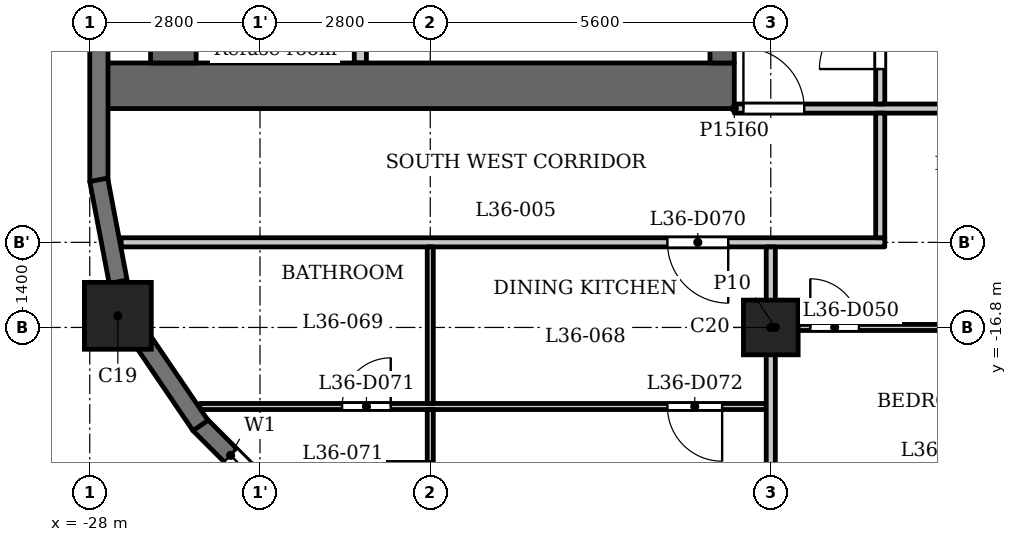
"""IFC4 building model, lengths in metres.
Left out: names, types, materials, properties, quantities, classifications, styles, units other than length and angle.
Written with IfcOpenShell. Run it as: python <this file> out.ifc"""

import sys

from ifc_helpers import new_model, si_unit, direction, frame, frame_2d, origin, origin_2d, place, context, subcontext, project, spatial, rectangle, extrude, element, fill, save


model = new_model("IFC4")
c1 = context("Model", 3, precision=1e-05, world=origin(), true_north=direction((0.0, 1.0)))
c2 = subcontext(c1, "Body", "Model", "MODEL_VIEW")
j1 = project(units=[si_unit("LENGTHUNIT", "METRE"), si_unit("PLANEANGLEUNIT", "RADIAN")], contexts=[c1])
p1 = place(None, origin())
s1 = spatial("IfcSite", under=j1, at=p1, CompositionType="ELEMENT")
p2 = place(p1, origin())
s2 = spatial("IfcBuilding", under=s1, at=p2, CompositionType="ELEMENT")
p3 = place(p2, frame((0.0, 0.0, 143.1)))
s3 = spatial("IfcBuildingStorey", under=s2, at=p3, CompositionType="ELEMENT", Elevation=143.1)
p4 = place(p3, frame((-27.538, -16.609, 0.0), z_axis=(0.0, 0.0, 1.0), x_axis=(1.0, 0.0, 0.0)))
e1 = element("IfcColumn", 1, at=p4, inside=s3, PredefinedType="COLUMN", context=c2, shape_type="SweptSolid", body=[
    extrude(rectangle(XDim=1.1, YDim=1.1, at=origin_2d()), origin(), (0.0, 0.0, 1.0), 3.5),
])
p5 = place(p3, frame((-16.8, -16.8, 0.0), z_axis=(0.0, 0.0, 1.0), x_axis=(1.0, 0.0, 0.0)))
e2 = element("IfcColumn", 2, at=p5, inside=s3, PredefinedType="COLUMN", context=c2, shape_type="SweptSolid", body=[
    extrude(rectangle(XDim=0.9, YDim=0.9, at=origin_2d()), origin(), (0.0, 0.0, 1.0), 3.5),
])
p6 = place(p3, frame((-26.197, -18.391, 0.0), z_axis=(0.0, 0.0, 1.0), x_axis=(0.707060717099, -0.707152842274, 0.0)))
e3 = element("IfcWall", 3, at=p6, inside=s3, PredefinedType="SOLIDWALL", context=c2, shape_type="SweptSolid", body=[
    extrude(rectangle(XDim=2.65, YDim=0.3, at=frame_2d((1.325, 0.0))), origin(), (0.0, 0.0, 1.0), 2.45),
])
p7 = place(p6, frame((0.725, 0.0, 0.6)))
e4 = element("IfcOpeningElement", 4, at=p7, cuts=e3, PredefinedType="OPENING", context=c2, shape_type="SweptSolid", body=[
    extrude(rectangle(XDim=1.2, YDim=1.55, at=frame_2d((0.6, 0.775))), frame((0.0, 0.16, 0.0), z_axis=(0.0, -1.0, 0.0), x_axis=(1.0, 0.0, 0.0)), (0.0, 0.0, 1.0), 0.32),
])
p8 = place(p3, frame((-27.85, -11.75, 0.0), z_axis=(0.0, 0.0, 1.0), x_axis=(0.0, -1.0, 0.0)))
e5 = element("IfcWall", 5, at=p8, inside=s3, PredefinedType="SOLIDWALL", context=c2, shape_type="SweptSolid", body=[
    extrude(rectangle(XDim=2.65, YDim=0.3, at=frame_2d((1.325, 0.0))), origin(), (0.0, 0.0, 1.0), 2.45),
])
p9 = place(p3, frame((-27.853, -14.372, 0.0), z_axis=(0.0, 0.0, 1.0), x_axis=(0.187302784601, -0.982302227871, 0.0)))
e6 = element("IfcWall", 6, at=p9, inside=s3, PredefinedType="SOLIDWALL", context=c2, shape_type="SweptSolid", body=[
    extrude(rectangle(XDim=1.706, YDim=0.3, at=frame_2d((0.853, 0.0))), origin(), (0.0, 0.0, 1.0), 2.45),
])
p10 = place(p3, frame((-27.138, -17.002, 0.0), z_axis=(0.0, 0.0, 1.0), x_axis=(0.562075160946, -0.827086158419, 0.0)))
e7 = element("IfcWall", 7, at=p10, inside=s3, PredefinedType="SOLIDWALL", context=c2, shape_type="SweptSolid", body=[
    extrude(rectangle(XDim=1.706, YDim=0.3, at=frame_2d((0.853, 0.0))), origin(), (0.0, 0.0, 1.0), 2.45),
])
p11 = place(p3, frame((-17.4, -12.825, 0.0), z_axis=(0.0, 0.0, 1.0), x_axis=(-1.0, 0.0, 0.0)))
e8 = element("IfcWall", 8, at=p11, inside=s3, PredefinedType="SHEAR", context=c2, shape_type="SweptSolid", body=[
    extrude(rectangle(XDim=10.4, YDim=0.75, at=frame_2d((5.2, 0.0))), origin(), (0.0, 0.0, 1.0), 3.2),
])
p12 = place(p3, frame((-17.6, -12.45, 0.0), z_axis=(0.0, 0.0, 1.0), x_axis=(0.0, 1.0, 0.0)))
e9 = element("IfcWall", 9, at=p12, inside=s3, PredefinedType="SHEAR", context=c2, shape_type="SweptSolid", body=[
    extrude(rectangle(XDim=24.9, YDim=0.4, at=frame_2d((12.45, 0.0))), origin(), (0.0, 0.0, 1.0), 3.2),
])
p13 = place(p12, frame((8.65, 0.0, 0.0)))
e10 = element("IfcOpeningElement", 10, at=p13, cuts=e9, PredefinedType="OPENING", context=c2, shape_type="SweptSolid", body=[
    extrude(rectangle(XDim=0.9, YDim=2.1, at=frame_2d((0.45, 1.05))), frame((0.0, 0.21, 0.0), z_axis=(0.0, -1.0, 0.0), x_axis=(1.0, 0.0, 0.0)), (0.0, 0.0, 1.0), 0.42),
])
p14 = place(p12, frame((15.6, 0.0, 0.0)))
e11 = element("IfcOpeningElement", 11, at=p14, cuts=e9, PredefinedType="OPENING", context=c2, shape_type="SweptSolid", body=[
    extrude(rectangle(XDim=1.1, YDim=2.1, at=frame_2d((0.55, 1.05))), frame((0.0, 0.21, 0.0), z_axis=(0.0, -1.0, 0.0), x_axis=(1.0, 0.0, 0.0)), (0.0, 0.0, 1.0), 0.42),
])
p15 = place(p12, frame((18.0, 0.0, 0.0)))
e12 = element("IfcOpeningElement", 12, at=p15, cuts=e9, PredefinedType="OPENING", context=c2, shape_type="SweptSolid", body=[
    extrude(rectangle(XDim=1.1, YDim=2.1, at=frame_2d((0.55, 1.05))), frame((0.0, 0.21, 0.0), z_axis=(0.0, -1.0, 0.0), x_axis=(1.0, 0.0, 0.0)), (0.0, 0.0, 1.0), 0.42),
])
p16 = place(p12, frame((23.025, 0.0, 0.0)))
e13 = element("IfcOpeningElement", 13, at=p16, cuts=e9, PredefinedType="OPENING", context=c2, shape_type="SweptSolid", body=[
    extrude(rectangle(XDim=1.1, YDim=2.1, at=frame_2d((0.55, 1.05))), frame((0.0, 0.21, 0.0), z_axis=(0.0, -1.0, 0.0), x_axis=(1.0, 0.0, 0.0)), (0.0, 0.0, 1.0), 0.42),
])
p17 = place(p12, frame((0.775, 0.0, 0.0)))
e14 = element("IfcOpeningElement", 14, at=p17, cuts=e9, PredefinedType="OPENING", context=c2, shape_type="SweptSolid", body=[
    extrude(rectangle(XDim=1.1, YDim=2.1, at=frame_2d((0.55, 1.05))), frame((0.0, 0.21, 0.0), z_axis=(0.0, -1.0, 0.0), x_axis=(1.0, 0.0, 0.0)), (0.0, 0.0, 1.0), 0.42),
])
p18 = place(p12, frame((12.925, 0.0, 0.0)))
e15 = element("IfcOpeningElement", 15, at=p18, cuts=e9, PredefinedType="OPENING", context=c2, shape_type="SweptSolid", body=[
    extrude(rectangle(XDim=1.8, YDim=2.1, at=frame_2d((0.9, 1.05))), frame((0.0, 0.21, 0.0), z_axis=(0.0, -1.0, 0.0), x_axis=(1.0, 0.0, 0.0)), (0.0, 0.0, 1.0), 0.42),
])
p19 = place(p3, frame((-26.625, -12.45, 0.0), z_axis=(0.0, 0.0, 1.0), x_axis=(0.0, 1.0, 0.0)))
e16 = element("IfcWall", 16, at=p19, inside=s3, PredefinedType="SHEAR", context=c2, shape_type="SweptSolid", body=[
    extrude(rectangle(XDim=24.9, YDim=0.75, at=frame_2d((12.45, 0.0))), origin(), (0.0, 0.0, 1.0), 3.2),
])
p20 = place(p3, frame((-23.55, -12.45, 0.0), z_axis=(0.0, 0.0, 1.0), x_axis=(0.0, 1.0, 0.0)))
e17 = element("IfcWall", 17, at=p20, inside=s3, PredefinedType="PARTITIONING", context=c2, shape_type="SweptSolid", body=[
    extrude(rectangle(XDim=2.65, YDim=0.2, at=frame_2d((1.325, 0.0))), origin(), (0.0, 0.0, 1.0), 3.2),
])
p21 = place(p20, frame((0.875, 0.0, 0.0)))
e18 = element("IfcOpeningElement", 18, at=p21, cuts=e17, PredefinedType="OPENING", context=c2, shape_type="SweptSolid", body=[
    extrude(rectangle(XDim=0.9, YDim=2.1, at=frame_2d((0.45, 1.05))), frame((0.0, 0.11, 0.0), z_axis=(0.0, -1.0, 0.0), x_axis=(1.0, 0.0, 0.0)), (0.0, 0.0, 1.0), 0.22),
])
p22 = place(p3, frame((-26.19, -18.1, 0.0), z_axis=(0.0, 0.0, 1.0), x_axis=(1.0, 0.0, 0.0)))
e19 = element("IfcWall", 19, at=p22, inside=s3, PredefinedType="PARTITIONING", context=c2, shape_type="SweptSolid", body=[
    extrude(rectangle(XDim=9.315, YDim=0.1, at=frame_2d((4.658, 0.0))), origin(), (0.0, 0.0, 1.0), 3.2),
])
p23 = place(p22, frame((2.34, 0.0, 0.0)))
e20 = element("IfcOpeningElement", 20, at=p23, cuts=e19, PredefinedType="OPENING", context=c2, shape_type="SweptSolid", body=[
    extrude(rectangle(XDim=0.8, YDim=2.1, at=frame_2d((0.4, 1.05))), frame((0.0, 0.06, 0.0), z_axis=(0.0, -1.0, 0.0), x_axis=(1.0, 0.0, 0.0)), (0.0, 0.0, 1.0), 0.12),
])
p24 = place(p22, frame((7.69, 0.0, 0.0)))
e21 = element("IfcOpeningElement", 21, at=p24, cuts=e19, PredefinedType="OPENING", context=c2, shape_type="SweptSolid", body=[
    extrude(rectangle(XDim=0.9, YDim=2.1, at=frame_2d((0.45, 1.05))), frame((0.0, 0.06, 0.0), z_axis=(0.0, -1.0, 0.0), x_axis=(1.0, 0.0, 0.0)), (0.0, 0.0, 1.0), 0.12),
])
p25 = place(p3, frame((-16.725, -16.8, 0.0), z_axis=(0.0, 0.0, 1.0), x_axis=(1.0, 0.0, 0.0)))
e22 = element("IfcWall", 22, at=p25, inside=s3, PredefinedType="PARTITIONING", context=c2, shape_type="SweptSolid", body=[
    extrude(rectangle(XDim=33.45, YDim=0.1, at=frame_2d((16.725, 0.0))), origin(), (0.0, 0.0, 1.0), 3.2),
])
p26 = place(p25, frame((0.575, 0.0, 0.0)))
e23 = element("IfcOpeningElement", 23, at=p26, cuts=e22, PredefinedType="OPENING", context=c2, shape_type="SweptSolid", body=[
    extrude(rectangle(XDim=0.8, YDim=2.1, at=frame_2d((0.4, 1.05))), frame((0.0, 0.06, 0.0), z_axis=(0.0, -1.0, 0.0), x_axis=(1.0, 0.0, 0.0)), (0.0, 0.0, 1.0), 0.12),
])
p27 = place(p25, frame((6.175, 0.0, 0.0)))
e24 = element("IfcOpeningElement", 24, at=p27, cuts=e22, PredefinedType="OPENING", context=c2, shape_type="SweptSolid", body=[
    extrude(rectangle(XDim=0.9, YDim=2.1, at=frame_2d((0.45, 1.05))), frame((0.0, 0.06, 0.0), z_axis=(0.0, -1.0, 0.0), x_axis=(1.0, 0.0, 0.0)), (0.0, 0.0, 1.0), 0.12),
])
p28 = place(p25, frame((15.275, 0.0, 0.0)))
e25 = element("IfcOpeningElement", 25, at=p28, cuts=e22, PredefinedType="OPENING", context=c2, shape_type="SweptSolid", body=[
    extrude(rectangle(XDim=0.8, YDim=2.1, at=frame_2d((0.4, 1.05))), frame((0.0, 0.06, 0.0), z_axis=(0.0, -1.0, 0.0), x_axis=(1.0, 0.0, 0.0)), (0.0, 0.0, 1.0), 0.12),
])
p29 = place(p25, frame((11.775, 0.0, 0.0)))
e26 = element("IfcOpeningElement", 26, at=p29, cuts=e22, PredefinedType="OPENING", context=c2, shape_type="SweptSolid", body=[
    extrude(rectangle(XDim=0.9, YDim=2.1, at=frame_2d((0.45, 1.05))), frame((0.0, 0.06, 0.0), z_axis=(0.0, -1.0, 0.0), x_axis=(1.0, 0.0, 0.0)), (0.0, 0.0, 1.0), 0.12),
])
p30 = place(p25, frame((17.275, 0.0, 0.0)))
e27 = element("IfcOpeningElement", 27, at=p30, cuts=e22, PredefinedType="OPENING", context=c2, shape_type="SweptSolid", body=[
    extrude(rectangle(XDim=0.8, YDim=2.1, at=frame_2d((0.4, 1.05))), frame((0.0, 0.06, 0.0), z_axis=(0.0, -1.0, 0.0), x_axis=(1.0, 0.0, 0.0)), (0.0, 0.0, 1.0), 0.12),
])
p31 = place(p25, frame((20.775, 0.0, 0.0)))
e28 = element("IfcOpeningElement", 28, at=p31, cuts=e22, PredefinedType="OPENING", context=c2, shape_type="SweptSolid", body=[
    extrude(rectangle(XDim=0.9, YDim=2.1, at=frame_2d((0.45, 1.05))), frame((0.0, 0.06, 0.0), z_axis=(0.0, -1.0, 0.0), x_axis=(1.0, 0.0, 0.0)), (0.0, 0.0, 1.0), 0.12),
])
p32 = place(p25, frame((31.575, 0.0, 0.0)))
e29 = element("IfcOpeningElement", 29, at=p32, cuts=e22, PredefinedType="OPENING", context=c2, shape_type="SweptSolid", body=[
    extrude(rectangle(XDim=0.8, YDim=2.1, at=frame_2d((0.4, 1.05))), frame((0.0, 0.06, 0.0), z_axis=(0.0, -1.0, 0.0), x_axis=(1.0, 0.0, 0.0)), (0.0, 0.0, 1.0), 0.12),
])
p33 = place(p25, frame((28.575, 0.0, 0.0)))
e30 = element("IfcOpeningElement", 30, at=p33, cuts=e22, PredefinedType="OPENING", context=c2, shape_type="SweptSolid", body=[
    extrude(rectangle(XDim=0.9, YDim=2.1, at=frame_2d((0.45, 1.05))), frame((0.0, 0.06, 0.0), z_axis=(0.0, -1.0, 0.0), x_axis=(1.0, 0.0, 0.0)), (0.0, 0.0, 1.0), 0.12),
])
p34 = place(p25, frame((23.725, 0.0, 0.0)))
e31 = element("IfcOpeningElement", 31, at=p34, cuts=e22, PredefinedType="OPENING", context=c2, shape_type="SweptSolid", body=[
    extrude(rectangle(XDim=0.9, YDim=2.1, at=frame_2d((0.45, 1.05))), frame((0.0, 0.06, 0.0), z_axis=(0.0, -1.0, 0.0), x_axis=(1.0, 0.0, 0.0)), (0.0, 0.0, 1.0), 0.12),
])
p35 = place(p25, frame((26.225, 0.0, 0.0)))
e32 = element("IfcOpeningElement", 32, at=p35, cuts=e22, PredefinedType="OPENING", context=c2, shape_type="SweptSolid", body=[
    extrude(rectangle(XDim=0.9, YDim=2.1, at=frame_2d((0.45, 1.05))), frame((0.0, 0.06, 0.0), z_axis=(0.0, -1.0, 0.0), x_axis=(1.0, 0.0, 0.0)), (0.0, 0.0, 1.0), 0.12),
])
p36 = place(p3, frame((-27.484, -15.4, 0.0), z_axis=(0.0, 0.0, 1.0), x_axis=(1.0, 0.0, 0.0)))
e33 = element("IfcWall", 33, at=p36, inside=s3, PredefinedType="PARTITIONING", context=c2, shape_type="SweptSolid", body=[
    extrude(rectangle(XDim=12.559, YDim=0.15, at=frame_2d((6.279, 0.0))), origin(), (0.0, 0.0, 1.0), 3.2),
])
p37 = place(p36, frame((8.984, 0.0, 0.0)))
e34 = element("IfcOpeningElement", 34, at=p37, cuts=e33, PredefinedType="OPENING", context=c2, shape_type="SweptSolid", body=[
    extrude(rectangle(XDim=1.0, YDim=2.1, at=frame_2d((0.5, 1.05))), frame((0.0, 0.085, 0.0), z_axis=(0.0, -1.0, 0.0), x_axis=(1.0, 0.0, 0.0)), (0.0, 0.0, 1.0), 0.17),
])
p38 = place(p3, frame((-17.4, -13.2, 0.0), z_axis=(0.0, 0.0, 1.0), x_axis=(1.0, 0.0, 0.0)))
e35 = element("IfcWall", 35, at=p38, inside=s3, PredefinedType="PARTITIONING", context=c2, shape_type="SweptSolid", body=[
    extrude(rectangle(XDim=34.8, YDim=0.15, at=frame_2d((17.4, 0.0))), origin(), (0.0, 0.0, 1.0), 3.2),
])
p39 = place(p38, frame((0.15, 0.0, 0.0)))
e36 = element("IfcOpeningElement", 36, at=p39, cuts=e35, PredefinedType="OPENING", context=c2, shape_type="SweptSolid", body=[
    extrude(rectangle(XDim=1.0, YDim=2.1, at=frame_2d((0.5, 1.05))), frame((0.0, 0.085, 0.0), z_axis=(0.0, -1.0, 0.0), x_axis=(1.0, 0.0, 0.0)), (0.0, 0.0, 1.0), 0.17),
])
p40 = place(p38, frame((33.55, 0.0, 0.0)))
e37 = element("IfcOpeningElement", 37, at=p40, cuts=e35, PredefinedType="OPENING", context=c2, shape_type="SweptSolid", body=[
    extrude(rectangle(XDim=1.0, YDim=2.1, at=frame_2d((0.5, 1.05))), frame((0.0, 0.085, 0.0), z_axis=(0.0, -1.0, 0.0), x_axis=(1.0, 0.0, 0.0)), (0.0, 0.0, 1.0), 0.17),
])
p41 = place(p38, frame((6.85, 0.0, 0.0)))
e38 = element("IfcOpeningElement", 38, at=p41, cuts=e35, PredefinedType="OPENING", context=c2, shape_type="SweptSolid", body=[
    extrude(rectangle(XDim=1.0, YDim=2.1, at=frame_2d((0.5, 1.05))), frame((0.0, 0.085, 0.0), z_axis=(0.0, -1.0, 0.0), x_axis=(1.0, 0.0, 0.0)), (0.0, 0.0, 1.0), 0.17),
])
p42 = place(p38, frame((12.45, 0.0, 0.0)))
e39 = element("IfcOpeningElement", 39, at=p42, cuts=e35, PredefinedType="OPENING", context=c2, shape_type="SweptSolid", body=[
    extrude(rectangle(XDim=1.0, YDim=2.1, at=frame_2d((0.5, 1.05))), frame((0.0, 0.085, 0.0), z_axis=(0.0, -1.0, 0.0), x_axis=(1.0, 0.0, 0.0)), (0.0, 0.0, 1.0), 0.17),
])
p43 = place(p38, frame((21.3, 0.0, 0.0)))
e40 = element("IfcOpeningElement", 40, at=p43, cuts=e35, PredefinedType="OPENING", context=c2, shape_type="SweptSolid", body=[
    extrude(rectangle(XDim=1.0, YDim=2.1, at=frame_2d((0.5, 1.05))), frame((0.0, 0.085, 0.0), z_axis=(0.0, -1.0, 0.0), x_axis=(1.0, 0.0, 0.0)), (0.0, 0.0, 1.0), 0.17),
])
p44 = place(p38, frame((26.9, 0.0, 0.0)))
e41 = element("IfcOpeningElement", 41, at=p44, cuts=e35, PredefinedType="OPENING", context=c2, shape_type="SweptSolid", body=[
    extrude(rectangle(XDim=1.0, YDim=2.1, at=frame_2d((0.5, 1.05))), frame((0.0, 0.085, 0.0), z_axis=(0.0, -1.0, 0.0), x_axis=(1.0, 0.0, 0.0)), (0.0, 0.0, 1.0), 0.17),
])
p45 = place(p3, frame((-22.4, -21.72, 0.0), z_axis=(0.0, 0.0, 1.0), x_axis=(0.0, 1.0, 0.0)))
e42 = element("IfcWall", 42, at=p45, inside=s3, PredefinedType="PARTITIONING", context=c2, shape_type="SweptSolid", body=[
    extrude(rectangle(XDim=3.57, YDim=0.1, at=frame_2d((1.785, 0.0))), origin(), (0.0, 0.0, 1.0), 3.2),
])
p46 = place(p45, frame((1.82, 0.0, 0.0)))
e43 = element("IfcOpeningElement", 43, at=p46, cuts=e42, PredefinedType="OPENING", context=c2, shape_type="SweptSolid", body=[
    extrude(rectangle(XDim=0.9, YDim=2.1, at=frame_2d((0.45, 1.05))), frame((0.0, 0.06, 0.0), z_axis=(0.0, -1.0, 0.0), x_axis=(1.0, 0.0, 0.0)), (0.0, 0.0, 1.0), 0.12),
])
p47 = place(p3, frame((-22.4, -18.05, 0.0), z_axis=(0.0, 0.0, 1.0), x_axis=(0.0, 1.0, 0.0)))
e44 = element("IfcWall", 44, at=p47, inside=s3, PredefinedType="PARTITIONING", context=c2, shape_type="SweptSolid", body=[
    extrude(rectangle(XDim=2.575, YDim=0.1, at=frame_2d((1.288, 0.0))), origin(), (0.0, 0.0, 1.0), 3.2),
])
p48 = place(p3, frame((-16.8, -22.93, 0.0), z_axis=(0.0, 0.0, 1.0), x_axis=(0.0, 1.0, 0.0)))
e45 = element("IfcWall", 45, at=p48, inside=s3, PredefinedType="PARTITIONING", context=c2, shape_type="SweptSolid", body=[
    extrude(rectangle(XDim=7.455, YDim=0.15, at=frame_2d((3.728, 0.0))), origin(), (0.0, 0.0, 1.0), 3.2),
])
p49 = place(p3, frame((-15.0, -15.325, 0.0), z_axis=(0.0, 0.0, 1.0), x_axis=(0.0, 1.0, 0.0)))
e46 = element("IfcWall", 46, at=p49, inside=s3, PredefinedType="PARTITIONING", context=c2, shape_type="SweptSolid", body=[
    extrude(rectangle(XDim=2.05, YDim=0.15, at=frame_2d((1.025, 0.0))), origin(), (0.0, 0.0, 1.0), 3.2),
])
p50 = place(p3, frame((-15.0, -13.125, 0.0), z_axis=(0.0, 0.0, 1.0), x_axis=(0.0, 1.0, 0.0)))
e47 = element("IfcWall", 47, at=p50, inside=s3, PredefinedType="PARTITIONING", context=c2, shape_type="SweptSolid", body=[
    extrude(rectangle(XDim=6.356, YDim=0.15, at=frame_2d((3.178, 0.0))), origin(), (0.0, 0.0, 1.0), 3.2),
])
p51 = place(p50, frame((0.575, 0.0, 0.0)))
e48 = element("IfcOpeningElement", 48, at=p51, cuts=e47, PredefinedType="OPENING", context=c2, shape_type="SweptSolid", body=[
    extrude(rectangle(XDim=1.0, YDim=2.1, at=frame_2d((0.5, 1.05))), frame((0.0, 0.085, 0.0), z_axis=(0.0, -1.0, 0.0), x_axis=(1.0, 0.0, 0.0)), (0.0, 0.0, 1.0), 0.17),
])
p52 = place(p51, origin())
e49 = element("IfcDoor", 49, at=p52, inside=s3, OperationType="SINGLE_SWING_RIGHT", PredefinedType="DOOR", context=c2, shape_type="SweptSolid", body=[
    extrude(rectangle(XDim=1.0, YDim=2.1, at=frame_2d((0.5, 1.05))), frame((0.0, 0.025, 0.0), z_axis=(0.0, -1.0, 0.0), x_axis=(1.0, 0.0, 0.0)), (0.0, 0.0, 1.0), 0.05),
])
fill(e48, e49)
p53 = place(p39, origin())
e50 = element("IfcDoor", 50, at=p53, inside=s3, OperationType="SINGLE_SWING_RIGHT", PredefinedType="DOOR", context=c2, shape_type="SweptSolid", body=[
    extrude(rectangle(XDim=1.0, YDim=2.1, at=frame_2d((0.5, 1.05))), frame((0.0, 0.025, 0.0), z_axis=(0.0, -1.0, 0.0), x_axis=(1.0, 0.0, 0.0)), (0.0, 0.0, 1.0), 0.05),
])
fill(e36, e50)
p54 = place(p26, origin())
e51 = element("IfcDoor", 51, at=p54, inside=s3, OperationType="SINGLE_SWING_RIGHT", PredefinedType="DOOR", context=c2, shape_type="SweptSolid", body=[
    extrude(rectangle(XDim=0.8, YDim=2.1, at=frame_2d((0.4, 1.05))), frame((0.0, 0.025, 0.0), z_axis=(0.0, -1.0, 0.0), x_axis=(1.0, 0.0, 0.0)), (0.0, 0.0, 1.0), 0.05),
])
fill(e23, e51)
p55 = place(p37, origin())
e52 = element("IfcDoor", 52, at=p55, inside=s3, OperationType="SINGLE_SWING_RIGHT", PredefinedType="DOOR", context=c2, shape_type="SweptSolid", body=[
    extrude(rectangle(XDim=1.0, YDim=2.1, at=frame_2d((0.5, 1.05))), frame((0.0, 0.025, 0.0), z_axis=(0.0, -1.0, 0.0), x_axis=(1.0, 0.0, 0.0)), (0.0, 0.0, 1.0), 0.05),
])
fill(e34, e52)
p56 = place(p23, origin())
e53 = element("IfcDoor", 53, at=p56, inside=s3, OperationType="SINGLE_SWING_LEFT", PredefinedType="DOOR", context=c2, shape_type="SweptSolid", body=[
    extrude(rectangle(XDim=0.8, YDim=2.1, at=frame_2d((0.4, 1.05))), frame((0.0, 0.025, 0.0), z_axis=(0.0, -1.0, 0.0), x_axis=(1.0, 0.0, 0.0)), (0.0, 0.0, 1.0), 0.05),
])
fill(e20, e53)
p57 = place(p24, origin())
e54 = element("IfcDoor", 54, at=p57, inside=s3, OperationType="SINGLE_SWING_RIGHT", PredefinedType="DOOR", context=c2, shape_type="SweptSolid", body=[
    extrude(rectangle(XDim=0.9, YDim=2.1, at=frame_2d((0.45, 1.05))), frame((0.0, 0.025, 0.0), z_axis=(0.0, -1.0, 0.0), x_axis=(1.0, 0.0, 0.0)), (0.0, 0.0, 1.0), 0.05),
])
fill(e21, e54)
p58 = place(p46, origin())
e55 = element("IfcDoor", 55, at=p58, inside=s3, OperationType="SINGLE_SWING_LEFT", PredefinedType="DOOR", context=c2, shape_type="SweptSolid", body=[
    extrude(rectangle(XDim=0.9, YDim=2.1, at=frame_2d((0.45, 1.05))), frame((0.0, 0.025, 0.0), z_axis=(0.0, -1.0, 0.0), x_axis=(1.0, 0.0, 0.0)), (0.0, 0.0, 1.0), 0.05),
])
fill(e43, e55)
p59 = place(p7, origin())
e56 = element("IfcWindow", 56, at=p59, inside=s3, PartitioningType="SINGLE_PANEL", PredefinedType="WINDOW", context=c2, shape_type="SweptSolid", body=[
    extrude(rectangle(XDim=1.2, YDim=1.55, at=frame_2d((0.6, 0.775))), frame((0.0, 0.03, 0.0), z_axis=(0.0, -1.0, 0.0), x_axis=(1.0, 0.0, 0.0)), (0.0, 0.0, 1.0), 0.06),
])
fill(e4, e56)
save(model, sys.argv[1])
